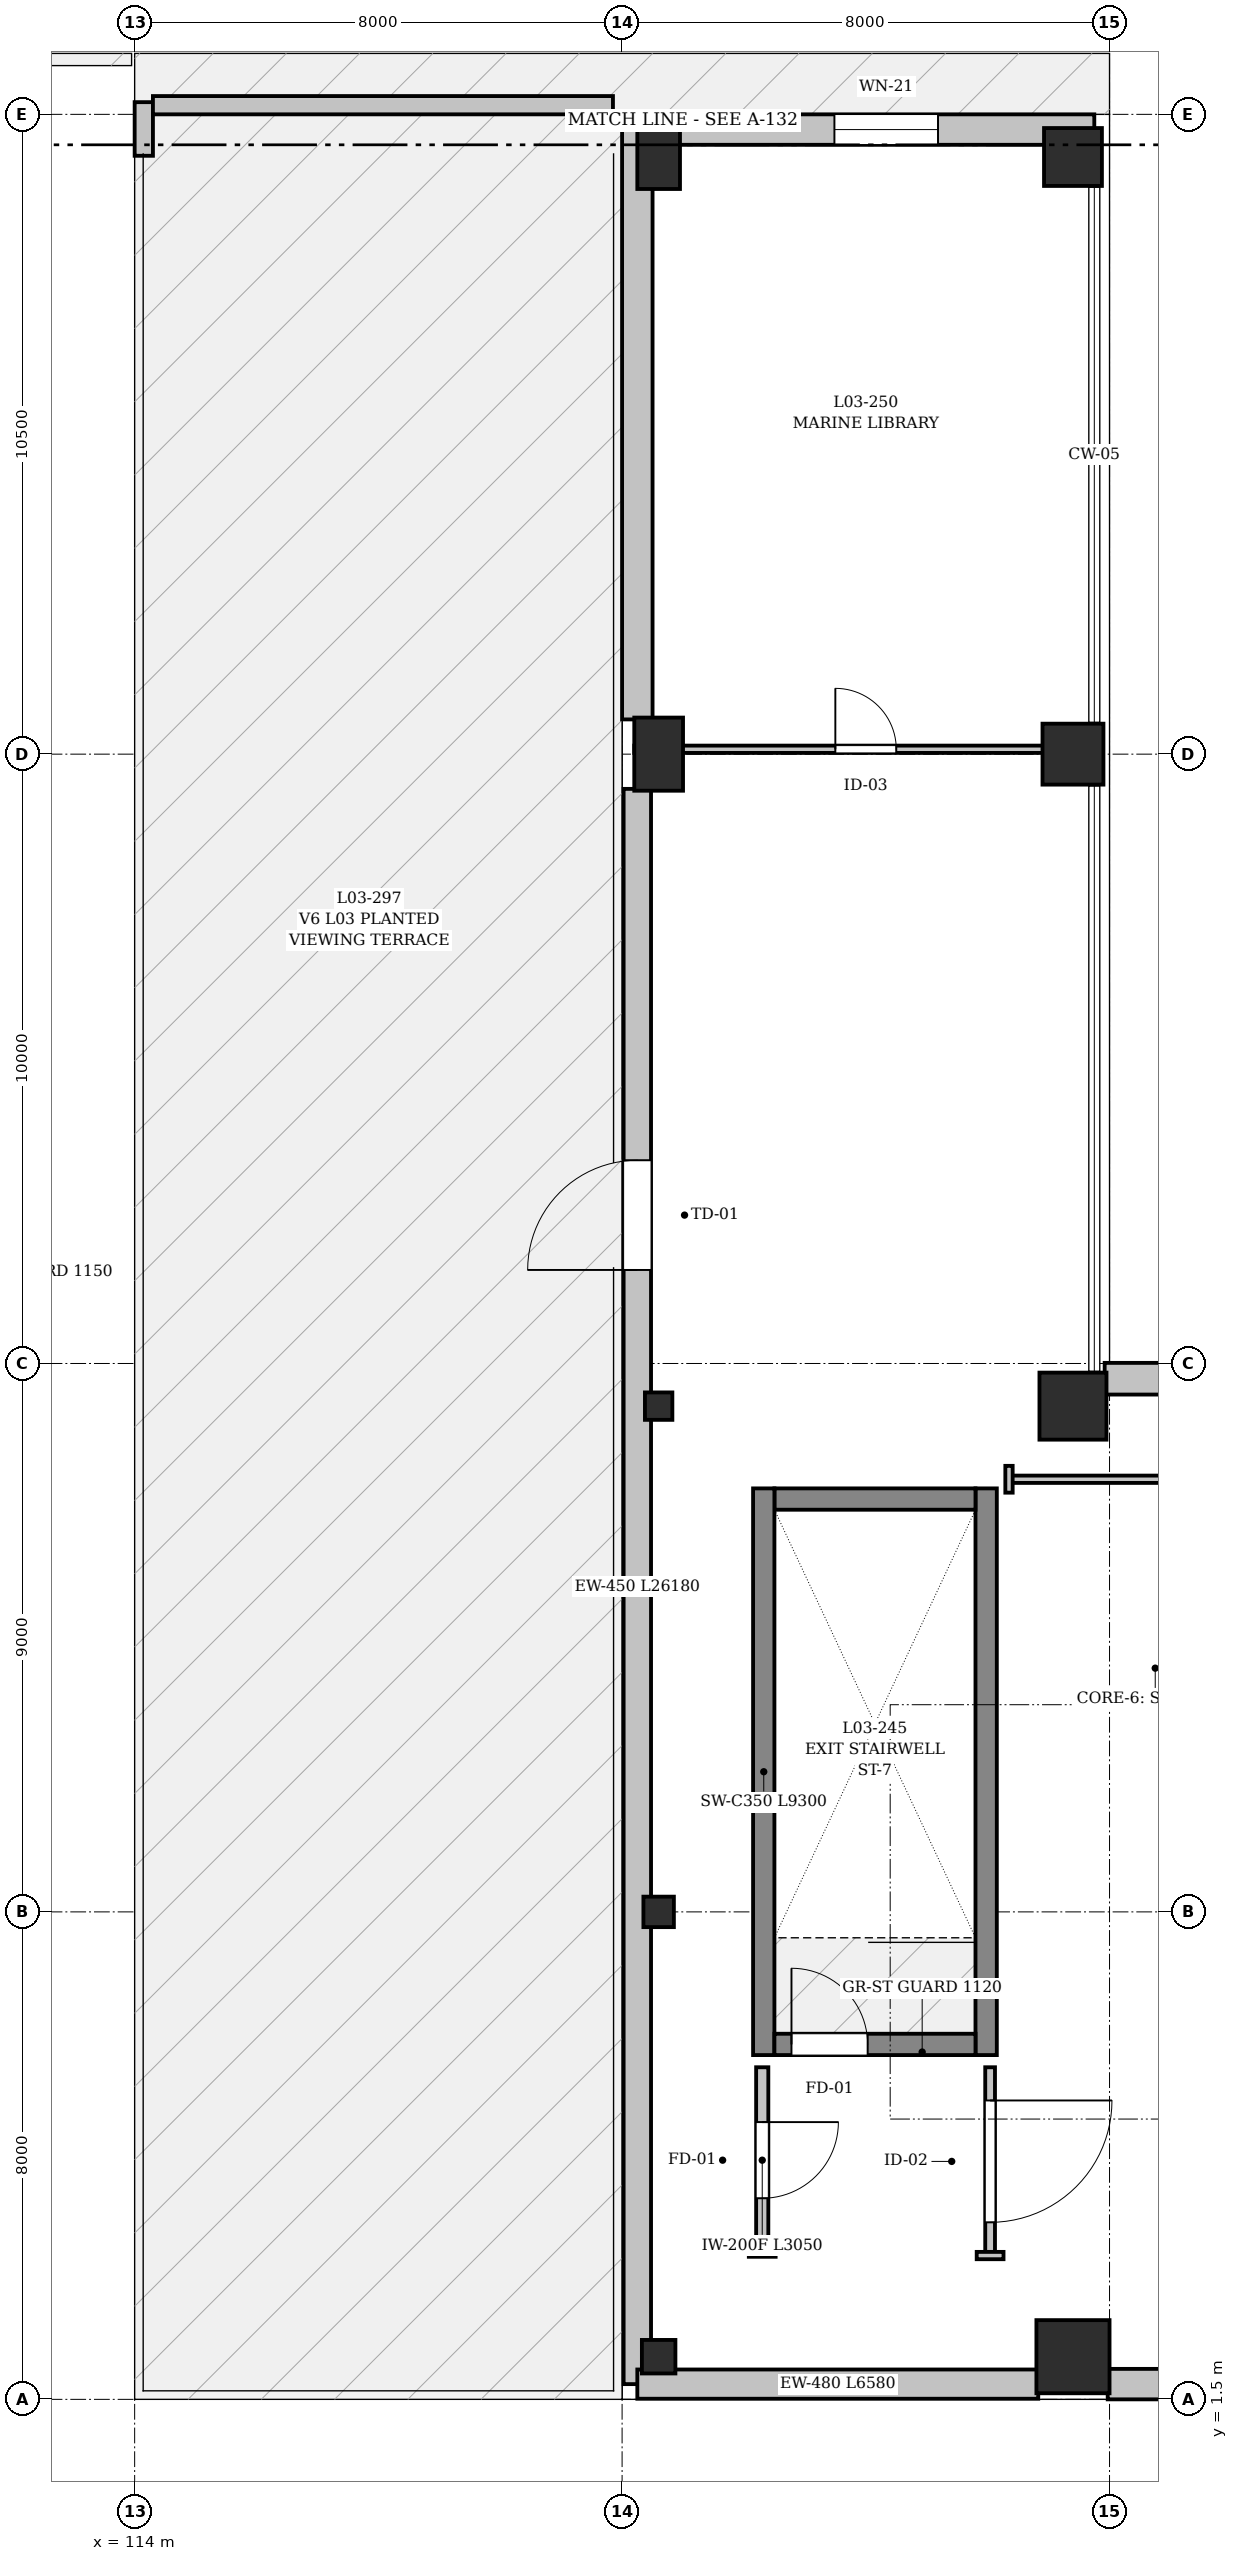
"""IFC4 building model, lengths in metres.
Left out: names, types, materials, properties, quantities, classifications, styles, units other than length and angle.
Written with IfcOpenShell. Run it as: python <this file> out.ifc"""

import sys

from ifc_helpers import new_model, si_unit, direction, frame, frame_2d, origin, origin_2d, place, context, subcontext, project, spatial, rectangle, extrude, element, fill, save


model = new_model("IFC4")
c1 = context("Model", 3, precision=1e-05, world=origin(), true_north=direction((0.0, 1.0)))
c2 = subcontext(c1, "Body", "Model", "MODEL_VIEW")
j1 = project(units=[si_unit("LENGTHUNIT", "METRE"), si_unit("PLANEANGLEUNIT", "RADIAN")], contexts=[c1])
p1 = place(None, origin())
s1 = spatial("IfcSite", under=j1, at=p1, CompositionType="ELEMENT")
p2 = place(p1, origin())
s2 = spatial("IfcBuilding", under=s1, at=p2, CompositionType="ELEMENT")
p3 = place(p2, frame((0.0, 0.0, 10.2)))
s3 = spatial("IfcBuildingStorey", under=s2, at=p3, CompositionType="ELEMENT", Elevation=10.2)
p4 = place(p3, frame((122.6, 2.2, 0.0), z_axis=(0.0, 0.0, 1.0), x_axis=(1.0, 0.0, 0.0)))
e1 = element("IfcColumn", 1, at=p4, inside=s3, PredefinedType="COLUMN", context=c2, shape_type="SweptSolid", body=[
    extrude(rectangle(XDim=0.55, YDim=0.55, at=origin_2d()), origin(), (0.0, 0.0, 1.0), 4.54),
])
p5 = place(p3, frame((122.6, 9.5, 0.0), z_axis=(0.0, 0.0, 1.0), x_axis=(1.0, 0.0, 0.0)))
e2 = element("IfcColumn", 2, at=p5, inside=s3, PredefinedType="COLUMN", context=c2, shape_type="SweptSolid", body=[
    extrude(rectangle(XDim=0.5, YDim=0.5, at=origin_2d()), origin(), (0.0, 0.0, 1.0), 4.54),
])
p6 = place(p3, frame((122.6, 17.8, 0.0), z_axis=(0.0, 0.0, 1.0), x_axis=(1.0, 0.0, 0.0)))
e3 = element("IfcColumn", 3, at=p6, inside=s3, PredefinedType="COLUMN", context=c2, shape_type="SweptSolid", body=[
    extrude(rectangle(XDim=0.45, YDim=0.45, at=origin_2d()), origin(), (0.0, 0.0, 1.0), 4.54),
])
p7 = place(p3, frame((122.6, 28.5, 0.0), z_axis=(0.0, 0.0, 1.0), x_axis=(1.0, 0.0, 0.0)))
e4 = element("IfcColumn", 4, at=p7, inside=s3, PredefinedType="COLUMN", context=c2, shape_type="SweptSolid", body=[
    extrude(rectangle(XDim=0.8, YDim=1.2, at=origin_2d()), origin(), (0.0, 0.0, 1.0), 4.54),
])
p8 = place(p3, frame((122.6, 38.3, 0.0), z_axis=(0.0, 0.0, 1.0), x_axis=(1.0, 0.0, 0.0)))
e5 = element("IfcColumn", 5, at=p8, inside=s3, PredefinedType="COLUMN", context=c2, shape_type="SweptSolid", body=[
    extrude(rectangle(XDim=0.7, YDim=1.05, at=origin_2d()), origin(), (0.0, 0.0, 1.0), 4.54),
])
p9 = place(p3, frame((129.4, 2.2, 0.0), z_axis=(0.0, 0.0, 1.0), x_axis=(1.0, 0.0, 0.0)))
e6 = element("IfcColumn", 6, at=p9, inside=s3, PredefinedType="COLUMN", context=c2, shape_type="SweptSolid", body=[
    extrude(rectangle(XDim=1.2, YDim=1.2, at=origin_2d()), origin(), (0.0, 0.0, 1.0), 4.54),
])
p10 = place(p3, frame((129.4, 17.8, 0.0), z_axis=(0.0, 0.0, 1.0), x_axis=(1.0, 0.0, 0.0)))
e7 = element("IfcColumn", 7, at=p10, inside=s3, PredefinedType="COLUMN", context=c2, shape_type="SweptSolid", body=[
    extrude(rectangle(XDim=1.1, YDim=1.1, at=origin_2d()), origin(), (0.0, 0.0, 1.0), 4.54),
])
p11 = place(p3, frame((129.4, 28.5, 0.0), z_axis=(0.0, 0.0, 1.0), x_axis=(1.0, 0.0, 0.0)))
e8 = element("IfcColumn", 8, at=p11, inside=s3, PredefinedType="COLUMN", context=c2, shape_type="SweptSolid", body=[
    extrude(rectangle(XDim=1.0, YDim=1.0, at=origin_2d()), origin(), (0.0, 0.0, 1.0), 4.54),
])
p12 = place(p3, frame((129.4, 38.3, 0.0), z_axis=(0.0, 0.0, 1.0), x_axis=(1.0, 0.0, 0.0)))
e9 = element("IfcColumn", 9, at=p12, inside=s3, PredefinedType="COLUMN", context=c2, shape_type="SweptSolid", body=[
    extrude(rectangle(XDim=0.95, YDim=0.95, at=origin_2d()), origin(), (0.0, 0.0, 1.0), 4.54),
])
p13 = place(p3, frame((122.25, 1.75, 0.0), z_axis=(0.0, 0.0, 1.0), x_axis=(0.0, 1.0, 0.0)))
e10 = element("IfcWall", 10, at=p13, inside=s3, PredefinedType="SOLIDWALL", context=c2, shape_type="SweptSolid", body=[
    extrude(rectangle(XDim=26.18, YDim=0.45, at=frame_2d((13.09, 0.0))), origin(), (0.0, 0.0, 1.0), 3.63),
])
p14 = place(p13, frame((18.285, 0.0, 0.0)))
e11 = element("IfcOpeningElement", 11, at=p14, cuts=e10, PredefinedType="OPENING", context=c2, shape_type="SweptSolid", body=[
    extrude(rectangle(XDim=1.8, YDim=2.4, at=frame_2d((0.9, 1.2))), frame((0.0, 0.235, 0.0), z_axis=(0.0, -1.0, 0.0), x_axis=(1.0, 0.0, 0.0)), (0.0, 0.0, 1.0), 0.47),
])
p15 = place(p3, frame((122.25, 29.07, 0.0), z_axis=(0.0, 0.0, 1.0), x_axis=(0.0, 1.0, 0.0)))
e12 = element("IfcWall", 12, at=p15, inside=s3, PredefinedType="SOLIDWALL", context=c2, shape_type="SweptSolid", body=[
    extrude(rectangle(XDim=9.68, YDim=0.5, at=frame_2d((4.84, 0.0))), origin(), (0.0, 0.0, 1.0), 3.63),
])
p16 = place(p3, frame((122.92, 38.75, 0.0), z_axis=(0.0, 0.0, 1.0), x_axis=(1.0, 0.0, 0.0)))
e13 = element("IfcWall", 13, at=p16, inside=s3, PredefinedType="SOLIDWALL", context=c2, shape_type="SweptSolid", body=[
    extrude(rectangle(XDim=6.83, YDim=0.5, at=frame_2d((3.415, 0.0))), origin(), (0.0, 0.0, 1.0), 3.63),
])
p17 = place(p16, frame((2.565, 0.0, 0.9)))
e14 = element("IfcOpeningElement", 14, at=p17, cuts=e13, PredefinedType="OPENING", context=c2, shape_type="SweptSolid", body=[
    extrude(rectangle(XDim=1.7, YDim=1.55, at=frame_2d((0.85, 0.775))), frame((0.0, 0.26, 0.0), z_axis=(0.0, -1.0, 0.0), x_axis=(1.0, 0.0, 0.0)), (0.0, 0.0, 1.0), 0.52),
])
p18 = place(p3, frame((129.92, 18.25, 0.0), z_axis=(0.0, 0.0, 1.0), x_axis=(1.0, 0.0, 0.0)))
e15 = element("IfcWall", 15, at=p18, inside=s3, PredefinedType="SOLIDWALL", context=c2, shape_type="SweptSolid", body=[
    extrude(rectangle(XDim=23.01, YDim=0.52, at=frame_2d((11.505, 0.0))), origin(), (0.0, 0.0, 1.0), 4.54),
])
p19 = place(p18, frame((5.355, 0.0, 0.9)))
e16 = element("IfcOpeningElement", 16, at=p19, cuts=e15, PredefinedType="OPENING", context=c2, shape_type="SweptSolid", body=[
    extrude(rectangle(XDim=1.5, YDim=2.1, at=frame_2d((0.75, 1.05))), frame((0.0, 0.27, 0.0), z_axis=(0.0, -1.0, 0.0), x_axis=(1.0, 0.0, 0.0)), (0.0, 0.0, 1.0), 0.54),
])
p20 = place(p18, frame((8.955, 0.0, 0.9)))
e17 = element("IfcOpeningElement", 17, at=p20, cuts=e15, PredefinedType="OPENING", context=c2, shape_type="SweptSolid", body=[
    extrude(rectangle(XDim=1.5, YDim=2.1, at=frame_2d((0.75, 1.05))), frame((0.0, 0.27, 0.0), z_axis=(0.0, -1.0, 0.0), x_axis=(1.0, 0.0, 0.0)), (0.0, 0.0, 1.0), 0.54),
])
p21 = place(p18, frame((12.555, 0.0, 0.9)))
e18 = element("IfcOpeningElement", 18, at=p21, cuts=e15, PredefinedType="OPENING", context=c2, shape_type="SweptSolid", body=[
    extrude(rectangle(XDim=1.5, YDim=2.1, at=frame_2d((0.75, 1.05))), frame((0.0, 0.27, 0.0), z_axis=(0.0, -1.0, 0.0), x_axis=(1.0, 0.0, 0.0)), (0.0, 0.0, 1.0), 0.54),
])
p22 = place(p18, frame((16.155, 0.0, 0.9)))
e19 = element("IfcOpeningElement", 19, at=p22, cuts=e15, PredefinedType="OPENING", context=c2, shape_type="SweptSolid", body=[
    extrude(rectangle(XDim=1.5, YDim=2.1, at=frame_2d((0.75, 1.05))), frame((0.0, 0.27, 0.0), z_axis=(0.0, -1.0, 0.0), x_axis=(1.0, 0.0, 0.0)), (0.0, 0.0, 1.0), 0.54),
])
p23 = place(p3, frame((153.75, 1.75, 0.0), z_axis=(0.0, 0.0, 1.0), x_axis=(-1.0, 0.0, 0.0)))
e20 = element("IfcWall", 20, at=p23, inside=s3, PredefinedType="SOLIDWALL", context=c2, shape_type="SweptSolid", body=[
    extrude(rectangle(XDim=23.78, YDim=0.5, at=frame_2d((11.89, 0.0))), origin(), (0.0, 0.0, 1.0), 4.54),
])
p24 = place(p23, frame((5.59, 0.0, 0.9)))
e21 = element("IfcOpeningElement", 21, at=p24, cuts=e20, PredefinedType="OPENING", context=c2, shape_type="SweptSolid", body=[
    extrude(rectangle(XDim=1.8, YDim=2.1, at=frame_2d((0.9, 1.05))), frame((0.0, 0.26, 0.0), z_axis=(0.0, -1.0, 0.0), x_axis=(1.0, 0.0, 0.0)), (0.0, 0.0, 1.0), 0.52),
])
p25 = place(p23, frame((9.19, 0.0, 0.9)))
e22 = element("IfcOpeningElement", 22, at=p25, cuts=e20, PredefinedType="OPENING", context=c2, shape_type="SweptSolid", body=[
    extrude(rectangle(XDim=1.8, YDim=2.1, at=frame_2d((0.9, 1.05))), frame((0.0, 0.26, 0.0), z_axis=(0.0, -1.0, 0.0), x_axis=(1.0, 0.0, 0.0)), (0.0, 0.0, 1.0), 0.52),
])
p26 = place(p23, frame((12.79, 0.0, 0.9)))
e23 = element("IfcOpeningElement", 23, at=p26, cuts=e20, PredefinedType="OPENING", context=c2, shape_type="SweptSolid", body=[
    extrude(rectangle(XDim=1.8, YDim=2.1, at=frame_2d((0.9, 1.05))), frame((0.0, 0.26, 0.0), z_axis=(0.0, -1.0, 0.0), x_axis=(1.0, 0.0, 0.0)), (0.0, 0.0, 1.0), 0.52),
])
p27 = place(p23, frame((16.39, 0.0, 0.9)))
e24 = element("IfcOpeningElement", 24, at=p27, cuts=e20, PredefinedType="OPENING", context=c2, shape_type="SweptSolid", body=[
    extrude(rectangle(XDim=1.8, YDim=2.1, at=frame_2d((0.9, 1.05))), frame((0.0, 0.26, 0.0), z_axis=(0.0, -1.0, 0.0), x_axis=(1.0, 0.0, 0.0)), (0.0, 0.0, 1.0), 0.52),
])
p28 = place(p3, frame((128.83, 1.75, 0.0), z_axis=(0.0, 0.0, 1.0), x_axis=(-1.0, 0.0, 0.0)))
e25 = element("IfcWall", 25, at=p28, inside=s3, PredefinedType="SOLIDWALL", context=c2, shape_type="SweptSolid", body=[
    extrude(rectangle(XDim=6.58, YDim=0.48, at=frame_2d((3.29, 0.0))), origin(), (0.0, 0.0, 1.0), 4.54),
])
p29 = place(p3, frame((114.15, 38.32, 0.0), z_axis=(0.0, 0.0, 1.0), x_axis=(0.0, 1.0, 0.0)))
e26 = element("IfcWall", 26, at=p29, inside=s3, PredefinedType="PARAPET", context=c2, shape_type="SweptSolid", body=[
    extrude(rectangle(XDim=0.88, YDim=0.3, at=frame_2d((0.44, 0.0))), origin(), (0.0, 0.0, 1.0), 1.15),
])
p30 = place(p3, frame((114.3, 39.15, 0.0), z_axis=(0.0, 0.0, 1.0), x_axis=(1.0, 0.0, 0.0)))
e27 = element("IfcWall", 27, at=p30, inside=s3, PredefinedType="PARAPET", context=c2, shape_type="SweptSolid", body=[
    extrude(rectangle(XDim=7.55, YDim=0.3, at=frame_2d((3.775, 0.0))), origin(), (0.0, 0.0, 1.0), 1.15),
])
p31 = place(p3, frame((127.975, 7.15, 0.0), z_axis=(0.0, 0.0, 1.0), x_axis=(0.0, 1.0, 0.0)))
e28 = element("IfcWall", 28, at=p31, inside=s3, PredefinedType="SHEAR", context=c2, shape_type="SweptSolid", body=[
    extrude(rectangle(XDim=9.3, YDim=0.35, at=frame_2d((4.65, 0.0))), origin(), (0.0, 0.0, 1.0), 3.6),
])
p32 = place(p3, frame((127.8, 16.275, 0.0), z_axis=(0.0, 0.0, 1.0), x_axis=(-1.0, 0.0, 0.0)))
e29 = element("IfcWall", 29, at=p32, inside=s3, PredefinedType="SHEAR", context=c2, shape_type="SweptSolid", body=[
    extrude(rectangle(XDim=3.3, YDim=0.35, at=frame_2d((1.65, 0.0))), origin(), (0.0, 0.0, 1.0), 3.6),
])
p33 = place(p3, frame((124.325, 16.45, 0.0), z_axis=(0.0, 0.0, 1.0), x_axis=(0.0, -1.0, 0.0)))
e30 = element("IfcWall", 30, at=p33, inside=s3, PredefinedType="SHEAR", context=c2, shape_type="SweptSolid", body=[
    extrude(rectangle(XDim=9.3, YDim=0.35, at=frame_2d((4.65, 0.0))), origin(), (0.0, 0.0, 1.0), 3.6),
])
p34 = place(p3, frame((124.5, 7.325, 0.0), z_axis=(0.0, 0.0, 1.0), x_axis=(1.0, 0.0, 0.0)))
e31 = element("IfcWall", 31, at=p34, inside=s3, PredefinedType="SHEAR", context=c2, shape_type="SweptSolid", body=[
    extrude(rectangle(XDim=3.3, YDim=0.35, at=frame_2d((1.65, 0.0))), origin(), (0.0, 0.0, 1.0), 3.6),
])
p35 = place(p34, frame((0.28, 0.0, 0.0)))
e32 = element("IfcOpeningElement", 32, at=p35, cuts=e31, PredefinedType="OPENING", context=c2, shape_type="SweptSolid", body=[
    extrude(rectangle(XDim=1.25, YDim=2.2, at=frame_2d((0.625, 1.1))), frame((0.0, 0.185, 0.0), z_axis=(0.0, -1.0, 0.0), x_axis=(1.0, 0.0, 0.0)), (0.0, 0.0, 1.0), 0.37),
])
p36 = place(p3, frame((124.3, 6.95, 0.0), z_axis=(0.0, 0.0, 1.0), x_axis=(0.0, -1.0, 0.0)))
e33 = element("IfcWall", 33, at=p36, inside=s3, PredefinedType="PARTITIONING", context=c2, shape_type="SweptSolid", body=[
    extrude(rectangle(XDim=3.05, YDim=0.2, at=frame_2d((1.525, 0.0))), origin(), (0.0, 0.0, 1.0), 3.55),
])
p37 = place(p36, frame((0.9, 0.0, 0.0)))
e34 = element("IfcOpeningElement", 34, at=p37, cuts=e33, PredefinedType="OPENING", context=c2, shape_type="SweptSolid", body=[
    extrude(rectangle(XDim=1.25, YDim=2.2, at=frame_2d((0.625, 1.1))), frame((0.0, 0.11, 0.0), z_axis=(0.0, -1.0, 0.0), x_axis=(1.0, 0.0, 0.0)), (0.0, 0.0, 1.0), 0.22),
])
p38 = place(p3, frame((152.5, 16.6, 0.0), z_axis=(0.0, 0.0, 1.0), x_axis=(-1.0, 0.0, 0.0)))
e35 = element("IfcWall", 35, at=p38, inside=s3, PredefinedType="PARTITIONING", context=c2, shape_type="SweptSolid", body=[
    extrude(rectangle(XDim=24.15, YDim=0.12, at=frame_2d((12.075, 0.0))), origin(), (0.0, 0.0, 1.0), 3.55),
])
p39 = place(p38, frame((11.575, 0.0, 0.0)))
e36 = element("IfcOpeningElement", 36, at=p39, cuts=e35, PredefinedType="OPENING", context=c2, shape_type="SweptSolid", body=[
    extrude(rectangle(XDim=1.0, YDim=2.2, at=frame_2d((0.5, 1.1))), frame((0.0, 0.07, 0.0), z_axis=(0.0, -1.0, 0.0), x_axis=(1.0, 0.0, 0.0)), (0.0, 0.0, 1.0), 0.14),
])
p40 = place(p3, frame((122.2, 28.58, 0.0), z_axis=(0.0, 0.0, 1.0), x_axis=(1.0, 0.0, 0.0)))
e37 = element("IfcWall", 37, at=p40, inside=s3, PredefinedType="PARTITIONING", context=c2, shape_type="SweptSolid", body=[
    extrude(rectangle(XDim=7.6, YDim=0.12, at=frame_2d((3.8, 0.0))), origin(), (0.0, 0.0, 1.0), 3.55),
])
p41 = place(p40, frame((3.3, 0.0, 0.0)))
e38 = element("IfcOpeningElement", 38, at=p41, cuts=e37, PredefinedType="OPENING", context=c2, shape_type="SweptSolid", body=[
    extrude(rectangle(XDim=1.0, YDim=2.2, at=frame_2d((0.5, 1.1))), frame((0.0, 0.07, 0.0), z_axis=(0.0, -1.0, 0.0), x_axis=(1.0, 0.0, 0.0)), (0.0, 0.0, 1.0), 0.14),
])
p42 = place(p3, frame((128.04, 6.95, 0.0), z_axis=(0.0, 0.0, 1.0), x_axis=(0.0, -1.0, 0.0)))
e39 = element("IfcWall", 39, at=p42, inside=s3, PredefinedType="PARTITIONING", context=c2, shape_type="SweptSolid", body=[
    extrude(rectangle(XDim=3.09, YDim=0.16, at=frame_2d((1.545, 0.0))), origin(), (0.0, 0.0, 1.0), 3.55),
])
p43 = place(p42, frame((0.545, 0.0, 0.0)))
e40 = element("IfcOpeningElement", 40, at=p43, cuts=e39, PredefinedType="OPENING", context=c2, shape_type="SweptSolid", body=[
    extrude(rectangle(XDim=2.0, YDim=2.4, at=frame_2d((1.0, 1.2))), frame((0.0, 0.09, 0.0), z_axis=(0.0, -1.0, 0.0), x_axis=(1.0, 0.0, 0.0)), (0.0, 0.0, 1.0), 0.18),
])
p44 = place(p3, frame((124.08, 3.9, 0.0), z_axis=(0.0, 0.0, 1.0), x_axis=(1.0, 0.0, 0.0)))
e41 = element("IfcWall", 41, at=p44, inside=s3, PredefinedType="PARTITIONING", context=c2, shape_type="SweptSolid", body=[
    extrude(rectangle(XDim=0.44, YDim=0.12, at=frame_2d((0.22, 0.0))), origin(), (0.0, 0.0, 1.0), 3.55),
])
p45 = place(p3, frame((128.35, 16.82, 0.0), z_axis=(0.0, 0.0, 1.0), x_axis=(0.0, -1.0, 0.0)))
e42 = element("IfcWall", 42, at=p45, inside=s3, PredefinedType="PARTITIONING", context=c2, shape_type="SweptSolid", body=[
    extrude(rectangle(XDim=0.44, YDim=0.12, at=frame_2d((0.22, 0.0))), origin(), (0.0, 0.0, 1.0), 3.55),
])
p46 = place(p3, frame((127.82, 3.86, 0.0), z_axis=(0.0, 0.0, 1.0), x_axis=(1.0, 0.0, 0.0)))
e43 = element("IfcWall", 43, at=p46, inside=s3, PredefinedType="PARTITIONING", context=c2, shape_type="SweptSolid", body=[
    extrude(rectangle(XDim=0.44, YDim=0.12, at=frame_2d((0.22, 0.0))), origin(), (0.0, 0.0, 1.0), 3.55),
])
p47 = place(p17, origin())
e44 = element("IfcWindow", 44, at=p47, inside=s3, PartitioningType="DOUBLE_PANEL_VERTICAL", PredefinedType="WINDOW", context=c2, shape_type="SweptSolid", body=[
    extrude(rectangle(XDim=1.7, YDim=1.55, at=frame_2d((0.85, 0.775))), frame((0.0, 0.03, 0.0), z_axis=(0.0, -1.0, 0.0), x_axis=(1.0, 0.0, 0.0)), (0.0, 0.0, 1.0), 0.06),
])
fill(e14, e44)
p48 = place(p14, origin())
e45 = element("IfcDoor", 45, at=p48, inside=s3, OperationType="DOUBLE_DOOR_SINGLE_SWING", PredefinedType="DOOR", context=c2, shape_type="SweptSolid", body=[
    extrude(rectangle(XDim=1.8, YDim=2.4, at=frame_2d((0.9, 1.2))), frame((0.0, 0.025, 0.0), z_axis=(0.0, -1.0, 0.0), x_axis=(1.0, 0.0, 0.0)), (0.0, 0.0, 1.0), 0.05),
])
fill(e11, e45)
p49 = place(p35, origin())
e46 = element("IfcDoor", 46, at=p49, inside=s3, OperationType="SINGLE_SWING_RIGHT", PredefinedType="DOOR", context=c2, shape_type="SweptSolid", body=[
    extrude(rectangle(XDim=1.25, YDim=2.2, at=frame_2d((0.625, 1.1))), frame((0.0, 0.025, 0.0), z_axis=(0.0, -1.0, 0.0), x_axis=(1.0, 0.0, 0.0)), (0.0, 0.0, 1.0), 0.05),
])
fill(e32, e46)
p50 = place(p37, origin())
e47 = element("IfcDoor", 47, at=p50, inside=s3, OperationType="SINGLE_SWING_LEFT", PredefinedType="DOOR", context=c2, shape_type="SweptSolid", body=[
    extrude(rectangle(XDim=1.25, YDim=2.2, at=frame_2d((0.625, 1.1))), frame((0.0, 0.025, 0.0), z_axis=(0.0, -1.0, 0.0), x_axis=(1.0, 0.0, 0.0)), (0.0, 0.0, 1.0), 0.05),
])
fill(e34, e47)
p51 = place(p41, origin())
e48 = element("IfcDoor", 48, at=p51, inside=s3, OperationType="SINGLE_SWING_LEFT", PredefinedType="DOOR", context=c2, shape_type="SweptSolid", body=[
    extrude(rectangle(XDim=1.0, YDim=2.2, at=frame_2d((0.5, 1.1))), frame((0.0, 0.025, 0.0), z_axis=(0.0, -1.0, 0.0), x_axis=(1.0, 0.0, 0.0)), (0.0, 0.0, 1.0), 0.05),
])
fill(e38, e48)
p52 = place(p43, origin())
e49 = element("IfcDoor", 49, at=p52, inside=s3, OperationType="DOUBLE_DOOR_DOUBLE_SWING", PredefinedType="DOOR", context=c2, shape_type="SweptSolid", body=[
    extrude(rectangle(XDim=2.0, YDim=2.4, at=frame_2d((1.0, 1.2))), frame((0.0, 0.025, 0.0), z_axis=(0.0, -1.0, 0.0), x_axis=(1.0, 0.0, 0.0)), (0.0, 0.0, 1.0), 0.05),
])
fill(e40, e49)
save(model, sys.argv[1])
